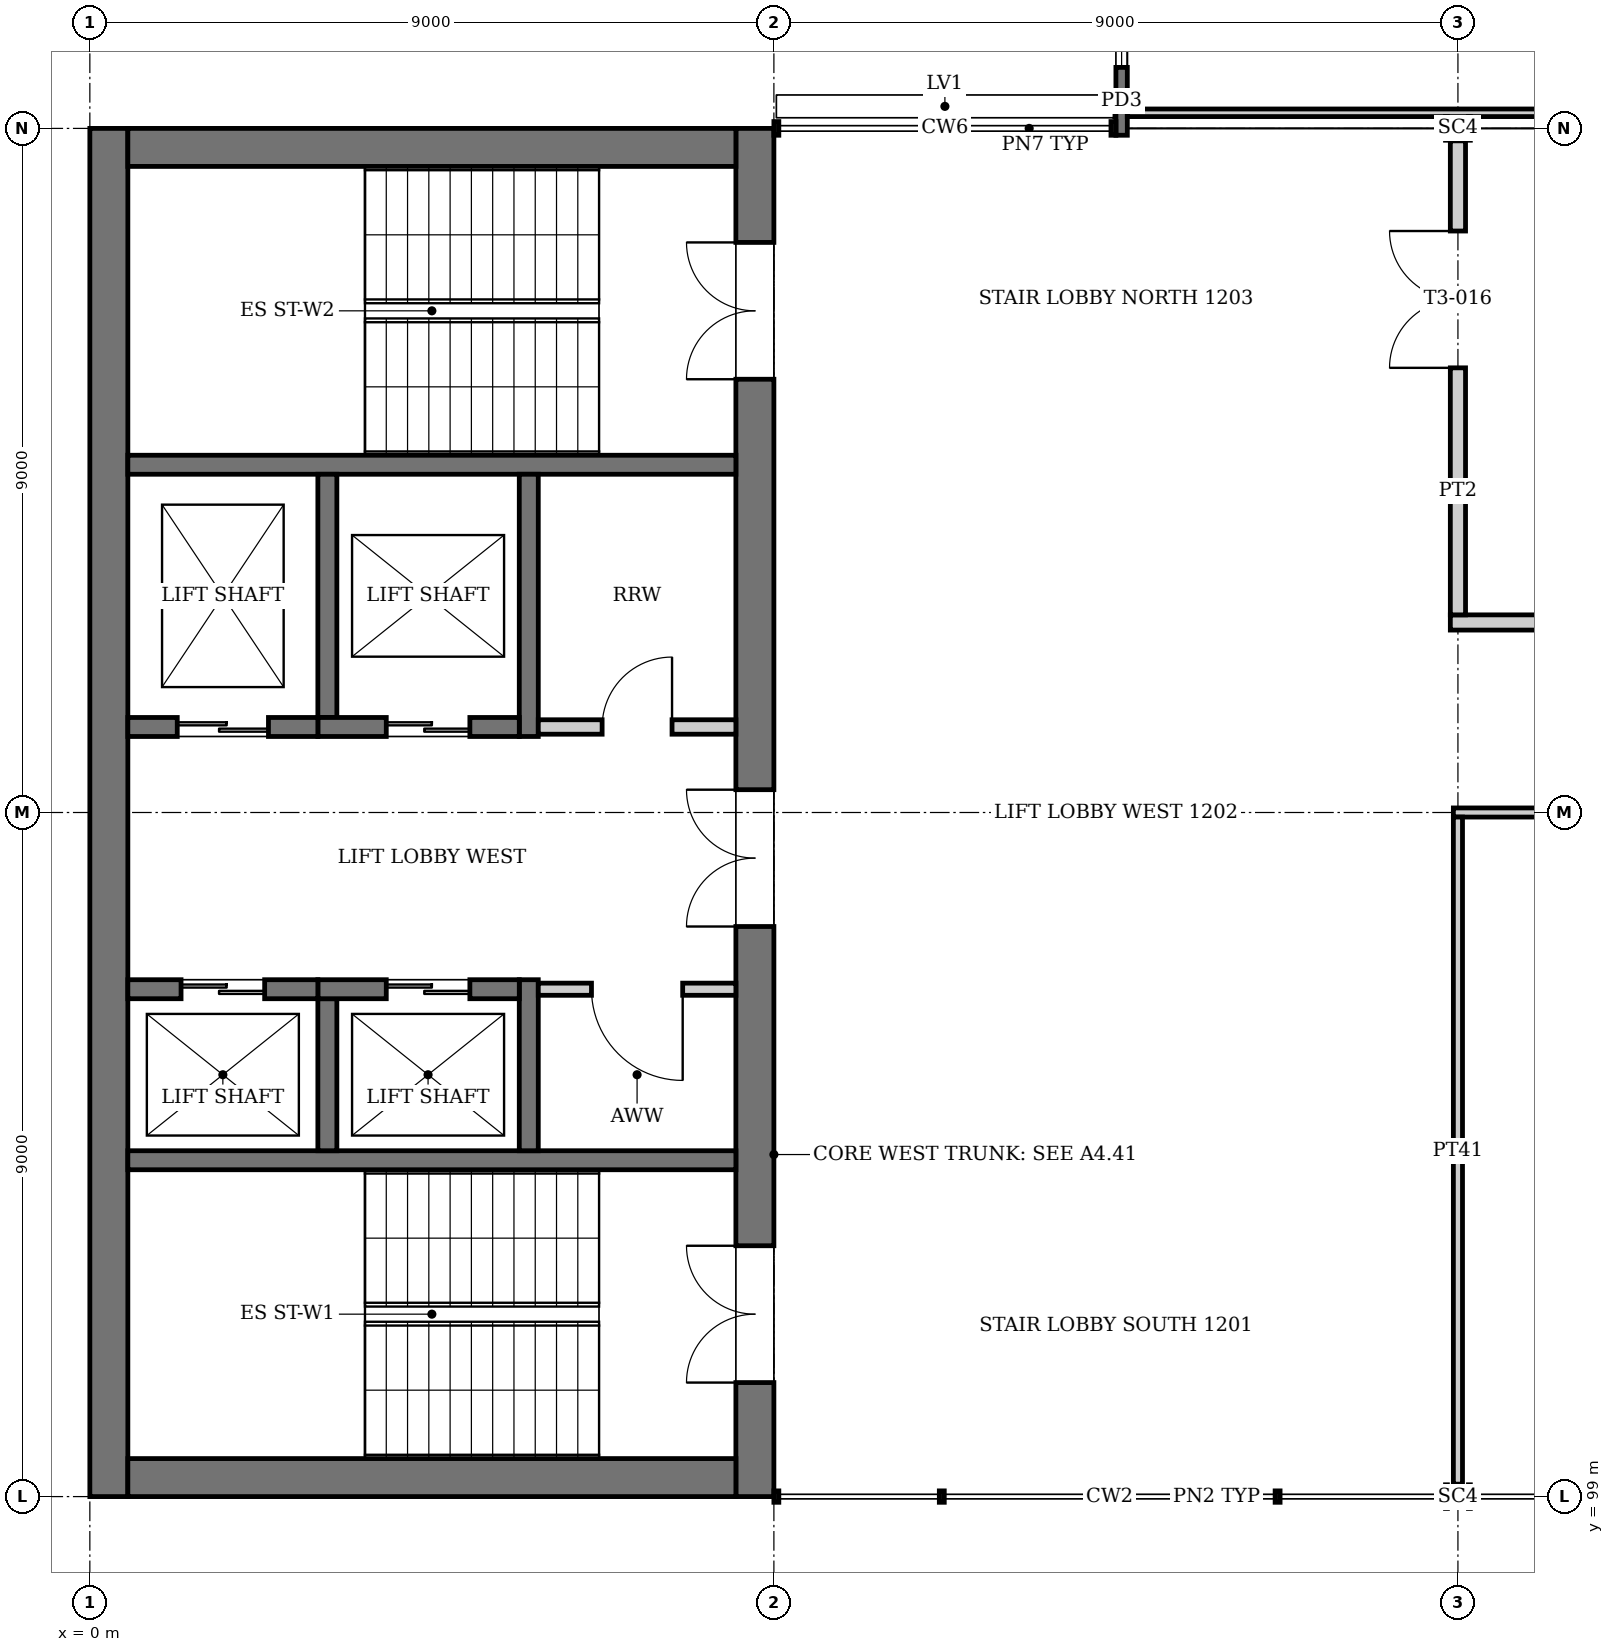
"""IFC4 building model, lengths in metres.
Left out: names, types, materials, properties, quantities, classifications, styles, units other than length and angle.
Written with IfcOpenShell. Run it as: python <this file> out.ifc"""

import sys

from ifc_helpers import new_model, si_unit, direction, frame, frame_2d, origin, origin_2d, place, context, subcontext, project, spatial, rectangle, i_section, extrude, element, fill, save


model = new_model("IFC4")
c1 = context("Model", 3, precision=1e-05, world=origin(), true_north=direction((0.0, 1.0)))
c2 = subcontext(c1, "Body", "Model", "MODEL_VIEW")
j1 = project(units=[si_unit("LENGTHUNIT", "METRE"), si_unit("PLANEANGLEUNIT", "RADIAN")], contexts=[c1])
p1 = place(None, origin())
s1 = spatial("IfcSite", under=j1, at=p1, CompositionType="ELEMENT")
p2 = place(p1, origin())
s2 = spatial("IfcBuilding", under=s1, at=p2, CompositionType="ELEMENT")
p3 = place(p2, frame((0.0, 0.0, 51.2)))
s3 = spatial("IfcBuildingStorey", under=s2, at=p3, CompositionType="ELEMENT", Elevation=51.2)
for number, where, z_axis, x_axis in (
    (1, (18.0, 99.0, 0.0), (0.0, 0.0, 1.0), (0.0, 1.0, 0.0)),
    (2, (18.0, 117.0, 0.0), (0.0, 0.0, 1.0), (0.0, 1.0, 0.0)),
):
    element("IfcColumn", number, at=place(p3, frame(where, z_axis=z_axis, x_axis=x_axis)), inside=s3, PredefinedType="COLUMN", context=c2, shape_type="SweptSolid", body=[
        extrude(i_section(OverallWidth=0.311, OverallDepth=0.327, WebThickness=0.016, FlangeThickness=0.025, at=origin_2d()), origin(), (0.0, 0.0, 1.0), 4.0),
    ])
p4 = place(p3, frame((0.25, 99.0, 0.0), z_axis=(0.0, 0.0, 1.0), x_axis=(0.0, 1.0, 0.0)))
e3 = element("IfcWall", 3, at=p4, inside=s3, PredefinedType="SHEAR", context=c2, shape_type="SweptSolid", body=[
    extrude(rectangle(XDim=18.0, YDim=0.5, at=frame_2d((9.0, 0.0))), origin(), (0.0, 0.0, 1.0), 4.0),
])
p5 = place(p3, frame((8.75, 99.0, 0.0), z_axis=(0.0, 0.0, 1.0), x_axis=(0.0, 1.0, 0.0)))
e4 = element("IfcWall", 4, at=p5, inside=s3, PredefinedType="SHEAR", context=c2, shape_type="SweptSolid", body=[
    extrude(rectangle(XDim=18.0, YDim=0.5, at=frame_2d((9.0, 0.0))), origin(), (0.0, 0.0, 1.0), 4.0),
])
p6 = place(p5, frame((1.5, 0.0, 0.0)))
e5 = element("IfcOpeningElement", 5, at=p6, cuts=e4, PredefinedType="OPENING", context=c2, shape_type="SweptSolid", body=[
    extrude(rectangle(XDim=1.8, YDim=2.1, at=frame_2d((0.9, 1.05))), frame((0.0, 0.26, 0.0), z_axis=(0.0, -1.0, 0.0), x_axis=(1.0, 0.0, 0.0)), (0.0, 0.0, 1.0), 0.52),
])
p7 = place(p5, frame((14.7, 0.0, 0.0)))
e6 = element("IfcOpeningElement", 6, at=p7, cuts=e4, PredefinedType="OPENING", context=c2, shape_type="SweptSolid", body=[
    extrude(rectangle(XDim=1.8, YDim=2.1, at=frame_2d((0.9, 1.05))), frame((0.0, 0.26, 0.0), z_axis=(0.0, -1.0, 0.0), x_axis=(1.0, 0.0, 0.0)), (0.0, 0.0, 1.0), 0.52),
])
p8 = place(p5, frame((7.5, 0.0, 0.0)))
e7 = element("IfcOpeningElement", 7, at=p8, cuts=e4, PredefinedType="OPENING", context=c2, shape_type="SweptSolid", body=[
    extrude(rectangle(XDim=1.8, YDim=2.1, at=frame_2d((0.9, 1.05))), frame((0.0, 0.26, 0.0), z_axis=(0.0, -1.0, 0.0), x_axis=(1.0, 0.0, 0.0)), (0.0, 0.0, 1.0), 0.52),
])
for number, where, z_axis, x_axis in (
    (8, (0.5, 99.25, 0.0), (0.0, 0.0, 1.0), (1.0, 0.0, 0.0)),
    (9, (0.5, 116.75, 0.0), (0.0, 0.0, 1.0), (1.0, 0.0, 0.0)),
):
    element("IfcWall", number, at=place(p3, frame(where, z_axis=z_axis, x_axis=x_axis)), inside=s3, PredefinedType="SHEAR", context=c2, shape_type="SweptSolid", body=[
        extrude(rectangle(XDim=8.0, YDim=0.5, at=frame_2d((4.0, 0.0))), origin(), (0.0, 0.0, 1.0), 4.0),
    ])
p9 = place(p3, frame((13.575, 120.45, -0.15), z_axis=(0.0, 0.0, 1.0), x_axis=(0.0, -1.0, 0.0)))
e10 = element("IfcWall", 10, at=p9, inside=s3, PredefinedType="SOLIDWALL", context=c2, shape_type="SweptSolid", body=[
    extrude(rectangle(XDim=3.54, YDim=0.15, at=frame_2d((1.77, 0.0))), origin(), (0.0, 0.0, 1.0), 2.75),
])
p10 = place(p9, frame((0.647, 0.0, 1.05)))
e11 = element("IfcOpeningElement", 11, at=p10, cuts=e10, PredefinedType="OPENING", context=c2, shape_type="SweptSolid", body=[
    extrude(rectangle(XDim=2.0, YDim=1.4, at=frame_2d((1.0, 0.7))), frame((0.0, 0.085, 0.0), z_axis=(0.0, -1.0, 0.0), x_axis=(1.0, 0.0, 0.0)), (0.0, 0.0, 1.0), 0.17),
])
p11 = place(p3, frame((13.65, 117.206, 0.0), z_axis=(0.0, 0.0, 1.0), x_axis=(1.0, 0.0, 0.0)))
e12 = element("IfcWall", 12, at=p11, inside=s3, PredefinedType="PARTITIONING", context=c2, shape_type="SweptSolid", body=[
    extrude(rectangle(XDim=13.2, YDim=0.1, at=frame_2d((6.6, 0.0))), origin(), (0.0, 0.0, 1.0), 2.6),
])
p12 = place(p11, frame((6.1, 0.0, 0.0)))
e13 = element("IfcOpeningElement", 13, at=p12, cuts=e12, PredefinedType="OPENING", context=c2, shape_type="SweptSolid", body=[
    extrude(rectangle(XDim=0.9, YDim=2.1, at=frame_2d((0.45, 1.05))), frame((0.0, 0.06, 0.0), z_axis=(0.0, -1.0, 0.0), x_axis=(1.0, 0.0, 0.0)), (0.0, 0.0, 1.0), 0.12),
])
for number, where, z_axis, x_axis in (
    (14, (8.5, 103.425, 0.0), (0.0, 0.0, 1.0), (-1.0, 0.0, 0.0)),
    (15, (8.5, 112.575, 0.0), (0.0, 0.0, 1.0), (-1.0, 0.0, 0.0)),
):
    element("IfcWall", number, at=place(p3, frame(where, z_axis=z_axis, x_axis=x_axis)), inside=s3, PredefinedType="SOLIDWALL", context=c2, shape_type="SweptSolid", body=[
        extrude(rectangle(XDim=8.0, YDim=0.25, at=frame_2d((4.0, 0.0))), origin(), (0.0, 0.0, 1.0), 3.75),
    ])
p13 = place(p3, frame((5.775, 103.55, 0.0), z_axis=(0.0, 0.0, 1.0), x_axis=(0.0, 1.0, 0.0)))
e16 = element("IfcWall", 16, at=p13, inside=s3, PredefinedType="SOLIDWALL", context=c2, shape_type="SweptSolid", body=[
    extrude(rectangle(XDim=2.25, YDim=0.25, at=frame_2d((1.125, 0.0))), origin(), (0.0, 0.0, 1.0), 4.0),
])
p14 = place(p3, frame((3.125, 103.55, 0.0), z_axis=(0.0, 0.0, 1.0), x_axis=(0.0, 1.0, 0.0)))
e17 = element("IfcWall", 17, at=p14, inside=s3, PredefinedType="SOLIDWALL", context=c2, shape_type="SweptSolid", body=[
    extrude(rectangle(XDim=2.0, YDim=0.25, at=frame_2d((1.0, 0.0))), origin(), (0.0, 0.0, 1.0), 4.0),
])
p15 = place(p3, frame((5.65, 105.675, 0.0), z_axis=(0.0, 0.0, 1.0), x_axis=(-1.0, 0.0, 0.0)))
e18 = element("IfcWall", 18, at=p15, inside=s3, PredefinedType="SOLIDWALL", context=c2, shape_type="SweptSolid", body=[
    extrude(rectangle(XDim=2.65, YDim=0.25, at=frame_2d((1.325, 0.0))), origin(), (0.0, 0.0, 1.0), 4.0),
])
p16 = place(p15, frame((0.65, 0.0, 0.0)))
e19 = element("IfcOpeningElement", 19, at=p16, cuts=e18, PredefinedType="OPENING", context=c2, shape_type="SweptSolid", body=[
    extrude(rectangle(XDim=1.1, YDim=2.1, at=frame_2d((0.55, 1.05))), frame((0.0, 0.135, 0.0), z_axis=(0.0, -1.0, 0.0), x_axis=(1.0, 0.0, 0.0)), (0.0, 0.0, 1.0), 0.27),
])
p17 = place(p3, frame((3.0, 105.675, 0.0), z_axis=(0.0, 0.0, 1.0), x_axis=(-1.0, 0.0, 0.0)))
e20 = element("IfcWall", 20, at=p17, inside=s3, PredefinedType="SOLIDWALL", context=c2, shape_type="SweptSolid", body=[
    extrude(rectangle(XDim=2.5, YDim=0.25, at=frame_2d((1.25, 0.0))), origin(), (0.0, 0.0, 1.0), 4.0),
])
p18 = place(p17, frame((0.7, 0.0, 0.0)))
e21 = element("IfcOpeningElement", 21, at=p18, cuts=e20, PredefinedType="OPENING", context=c2, shape_type="SweptSolid", body=[
    extrude(rectangle(XDim=1.1, YDim=2.1, at=frame_2d((0.55, 1.05))), frame((0.0, 0.135, 0.0), z_axis=(0.0, -1.0, 0.0), x_axis=(1.0, 0.0, 0.0)), (0.0, 0.0, 1.0), 0.27),
])
p19 = place(p3, frame((5.775, 109.0, 0.0), z_axis=(0.0, 0.0, 1.0), x_axis=(0.0, 1.0, 0.0)))
e22 = element("IfcWall", 22, at=p19, inside=s3, PredefinedType="SOLIDWALL", context=c2, shape_type="SweptSolid", body=[
    extrude(rectangle(XDim=3.45, YDim=0.25, at=frame_2d((1.725, 0.0))), origin(), (0.0, 0.0, 1.0), 4.0),
])
p20 = place(p3, frame((3.125, 109.25, 0.0), z_axis=(0.0, 0.0, 1.0), x_axis=(0.0, 1.0, 0.0)))
e23 = element("IfcWall", 23, at=p20, inside=s3, PredefinedType="SOLIDWALL", context=c2, shape_type="SweptSolid", body=[
    extrude(rectangle(XDim=3.2, YDim=0.25, at=frame_2d((1.6, 0.0))), origin(), (0.0, 0.0, 1.0), 4.0),
])
p21 = place(p3, frame((5.65, 109.125, 0.0), z_axis=(0.0, 0.0, 1.0), x_axis=(-1.0, 0.0, 0.0)))
e24 = element("IfcWall", 24, at=p21, inside=s3, PredefinedType="SOLIDWALL", context=c2, shape_type="SweptSolid", body=[
    extrude(rectangle(XDim=2.65, YDim=0.25, at=frame_2d((1.325, 0.0))), origin(), (0.0, 0.0, 1.0), 4.0),
])
p22 = place(p21, frame((0.65, 0.0, 0.0)))
e25 = element("IfcOpeningElement", 25, at=p22, cuts=e24, PredefinedType="OPENING", context=c2, shape_type="SweptSolid", body=[
    extrude(rectangle(XDim=1.1, YDim=2.1, at=frame_2d((0.55, 1.05))), frame((0.0, 0.135, 0.0), z_axis=(0.0, -1.0, 0.0), x_axis=(1.0, 0.0, 0.0)), (0.0, 0.0, 1.0), 0.27),
])
p23 = place(p3, frame((3.0, 109.125, 0.0), z_axis=(0.0, 0.0, 1.0), x_axis=(-1.0, 0.0, 0.0)))
e26 = element("IfcWall", 26, at=p23, inside=s3, PredefinedType="SOLIDWALL", context=c2, shape_type="SweptSolid", body=[
    extrude(rectangle(XDim=2.5, YDim=0.25, at=frame_2d((1.25, 0.0))), origin(), (0.0, 0.0, 1.0), 4.0),
])
p24 = place(p23, frame((0.65, 0.0, 0.0)))
e27 = element("IfcOpeningElement", 27, at=p24, cuts=e26, PredefinedType="OPENING", context=c2, shape_type="SweptSolid", body=[
    extrude(rectangle(XDim=1.2, YDim=2.1, at=frame_2d((0.6, 1.05))), frame((0.0, 0.135, 0.0), z_axis=(0.0, -1.0, 0.0), x_axis=(1.0, 0.0, 0.0)), (0.0, 0.0, 1.0), 0.27),
])
p25 = place(p3, frame((8.5, 105.675, 0.0), z_axis=(0.0, 0.0, 1.0), x_axis=(-1.0, 0.0, 0.0)))
e28 = element("IfcWall", 28, at=p25, inside=s3, PredefinedType="PARTITIONING", context=c2, shape_type="SweptSolid", body=[
    extrude(rectangle(XDim=2.6, YDim=0.16, at=frame_2d((1.3, 0.0))), origin(), (0.0, 0.0, 1.0), 3.75),
])
p26 = place(p25, frame((0.7, 0.0, 0.0)))
e29 = element("IfcOpeningElement", 29, at=p26, cuts=e28, PredefinedType="OPENING", context=c2, shape_type="SweptSolid", body=[
    extrude(rectangle(XDim=1.2, YDim=2.1, at=frame_2d((0.6, 1.05))), frame((0.0, 0.09, 0.0), z_axis=(0.0, -1.0, 0.0), x_axis=(1.0, 0.0, 0.0)), (0.0, 0.0, 1.0), 0.18),
])
p27 = place(p3, frame((8.5, 109.125, 0.0), z_axis=(0.0, 0.0, 1.0), x_axis=(-1.0, 0.0, 0.0)))
e30 = element("IfcWall", 30, at=p27, inside=s3, PredefinedType="PARTITIONING", context=c2, shape_type="SweptSolid", body=[
    extrude(rectangle(XDim=2.6, YDim=0.19, at=frame_2d((1.3, 0.0))), origin(), (0.0, 0.0, 1.0), 3.75),
])
p28 = place(p27, frame((0.84, 0.0, 0.0)))
e31 = element("IfcOpeningElement", 31, at=p28, cuts=e30, PredefinedType="OPENING", context=c2, shape_type="SweptSolid", body=[
    extrude(rectangle(XDim=0.92, YDim=2.1, at=frame_2d((0.46, 1.05))), frame((0.0, 0.105, 0.0), z_axis=(0.0, -1.0, 0.0), x_axis=(1.0, 0.0, 0.0)), (0.0, 0.0, 1.0), 0.21),
])
p29 = place(p3, frame((17.94, 108.0, 0.0), z_axis=(0.0, 0.0, 1.0), x_axis=(1.0, 0.0, 0.0)))
e32 = element("IfcWall", 32, at=p29, inside=s3, PredefinedType="PARTITIONING", context=c2, shape_type="SweptSolid", body=[
    extrude(rectangle(XDim=17.985, YDim=0.12, at=frame_2d((8.993, 0.0))), origin(), (0.0, 0.0, 1.0), 3.05),
])
p30 = place(p29, frame((3.66, 0.0, 0.0)))
e33 = element("IfcOpeningElement", 33, at=p30, cuts=e32, PredefinedType="OPENING", context=c2, shape_type="SweptSolid", body=[
    extrude(rectangle(XDim=1.8, YDim=2.1, at=frame_2d((0.9, 1.05))), frame((0.0, 0.07, 0.0), z_axis=(0.0, -1.0, 0.0), x_axis=(1.0, 0.0, 0.0)), (0.0, 0.0, 1.0), 0.14),
])
p31 = place(p29, frame((12.66, 0.0, 0.0)))
e34 = element("IfcOpeningElement", 34, at=p31, cuts=e32, PredefinedType="OPENING", context=c2, shape_type="SweptSolid", body=[
    extrude(rectangle(XDim=1.8, YDim=2.1, at=frame_2d((0.9, 1.05))), frame((0.0, 0.07, 0.0), z_axis=(0.0, -1.0, 0.0), x_axis=(1.0, 0.0, 0.0)), (0.0, 0.0, 1.0), 0.14),
])
p32 = place(p3, frame((17.9, 110.5, 0.0), z_axis=(0.0, 0.0, 1.0), x_axis=(1.0, 0.0, 0.0)))
e35 = element("IfcWall", 35, at=p32, inside=s3, PredefinedType="PARTITIONING", context=c2, shape_type="SweptSolid", body=[
    extrude(rectangle(XDim=22.7, YDim=0.2, at=frame_2d((11.35, 0.0))), origin(), (0.0, 0.0, 1.0), 3.05),
])
p33 = place(p32, frame((10.45, 0.0, 0.0)))
e36 = element("IfcOpeningElement", 36, at=p33, cuts=e35, PredefinedType="OPENING", context=c2, shape_type="SweptSolid", body=[
    extrude(rectangle(XDim=1.8, YDim=2.1, at=frame_2d((0.9, 1.05))), frame((0.0, 0.11, 0.0), z_axis=(0.0, -1.0, 0.0), x_axis=(1.0, 0.0, 0.0)), (0.0, 0.0, 1.0), 0.22),
])
p34 = place(p3, frame((18.0, 99.164, 0.0), z_axis=(0.0, 0.0, 1.0), x_axis=(0.0, 1.0, 0.0)))
e37 = element("IfcWall", 37, at=p34, inside=s3, PredefinedType="PARTITIONING", context=c2, shape_type="SweptSolid", body=[
    extrude(rectangle(XDim=8.776, YDim=0.12, at=frame_2d((4.388, 0.0))), origin(), (0.0, 0.0, 1.0), 3.05),
])
p35 = place(p3, frame((18.0, 110.6, 0.0), z_axis=(0.0, 0.0, 1.0), x_axis=(0.0, 1.0, 0.0)))
e38 = element("IfcWall", 38, at=p35, inside=s3, PredefinedType="PARTITIONING", context=c2, shape_type="SweptSolid", body=[
    extrude(rectangle(XDim=6.236, YDim=0.2, at=frame_2d((3.118, 0.0))), origin(), (0.0, 0.0, 1.0), 3.05),
])
p36 = place(p35, frame((3.25, 0.0, 0.0)))
e39 = element("IfcOpeningElement", 39, at=p36, cuts=e38, PredefinedType="OPENING", context=c2, shape_type="SweptSolid", body=[
    extrude(rectangle(XDim=1.8, YDim=2.1, at=frame_2d((0.9, 1.05))), frame((0.0, 0.11, 0.0), z_axis=(0.0, -1.0, 0.0), x_axis=(1.0, 0.0, 0.0)), (0.0, 0.0, 1.0), 0.22),
])
p37 = place(p10, origin())
e40 = element("IfcWindow", 40, at=p37, inside=s3, PartitioningType="SINGLE_PANEL", PredefinedType="WINDOW", context=c2, shape_type="SweptSolid", body=[
    extrude(rectangle(XDim=2.0, YDim=1.4, at=frame_2d((1.0, 0.7))), frame((0.0, 0.03, 0.0), z_axis=(0.0, -1.0, 0.0), x_axis=(1.0, 0.0, 0.0)), (0.0, 0.0, 1.0), 0.06),
])
fill(e11, e40)
p38 = place(p16, origin())
e41 = element("IfcDoor", 41, at=p38, inside=s3, OperationType="DOUBLE_DOOR_SLIDING", PredefinedType="DOOR", context=c2, shape_type="SweptSolid", body=[
    extrude(rectangle(XDim=1.1, YDim=2.1, at=frame_2d((0.55, 1.05))), frame((0.0, 0.025, 0.0), z_axis=(0.0, -1.0, 0.0), x_axis=(1.0, 0.0, 0.0)), (0.0, 0.0, 1.0), 0.05),
])
fill(e19, e41)
p39 = place(p18, origin())
e42 = element("IfcDoor", 42, at=p39, inside=s3, OperationType="DOUBLE_DOOR_SLIDING", PredefinedType="DOOR", context=c2, shape_type="SweptSolid", body=[
    extrude(rectangle(XDim=1.1, YDim=2.1, at=frame_2d((0.55, 1.05))), frame((0.0, 0.025, 0.0), z_axis=(0.0, -1.0, 0.0), x_axis=(1.0, 0.0, 0.0)), (0.0, 0.0, 1.0), 0.05),
])
fill(e21, e42)
p40 = place(p22, origin())
e43 = element("IfcDoor", 43, at=p40, inside=s3, OperationType="DOUBLE_DOOR_SLIDING", PredefinedType="DOOR", context=c2, shape_type="SweptSolid", body=[
    extrude(rectangle(XDim=1.1, YDim=2.1, at=frame_2d((0.55, 1.05))), frame((0.0, 0.025, 0.0), z_axis=(0.0, -1.0, 0.0), x_axis=(1.0, 0.0, 0.0)), (0.0, 0.0, 1.0), 0.05),
])
fill(e25, e43)
p41 = place(p24, origin())
e44 = element("IfcDoor", 44, at=p41, inside=s3, OperationType="DOUBLE_DOOR_SLIDING", PredefinedType="DOOR", context=c2, shape_type="SweptSolid", body=[
    extrude(rectangle(XDim=1.2, YDim=2.1, at=frame_2d((0.6, 1.05))), frame((0.0, 0.025, 0.0), z_axis=(0.0, -1.0, 0.0), x_axis=(1.0, 0.0, 0.0)), (0.0, 0.0, 1.0), 0.05),
])
fill(e27, e44)
p42 = place(p36, origin())
e45 = element("IfcDoor", 45, at=p42, inside=s3, OperationType="DOUBLE_DOOR_SINGLE_SWING", PredefinedType="DOOR", context=c2, shape_type="SweptSolid", body=[
    extrude(rectangle(XDim=1.8, YDim=2.1, at=frame_2d((0.9, 1.05))), frame((0.0, 0.025, 0.0), z_axis=(0.0, -1.0, 0.0), x_axis=(1.0, 0.0, 0.0)), (0.0, 0.0, 1.0), 0.05),
])
fill(e39, e45)
p43 = place(p6, origin())
e46 = element("IfcDoor", 46, at=p43, inside=s3, OperationType="DOUBLE_DOOR_SINGLE_SWING", PredefinedType="DOOR", context=c2, shape_type="SweptSolid", body=[
    extrude(rectangle(XDim=1.8, YDim=2.1, at=frame_2d((0.9, 1.05))), frame((0.0, 0.025, 0.0), z_axis=(0.0, -1.0, 0.0), x_axis=(1.0, 0.0, 0.0)), (0.0, 0.0, 1.0), 0.05),
])
fill(e5, e46)
p44 = place(p7, origin())
e47 = element("IfcDoor", 47, at=p44, inside=s3, OperationType="DOUBLE_DOOR_SINGLE_SWING", PredefinedType="DOOR", context=c2, shape_type="SweptSolid", body=[
    extrude(rectangle(XDim=1.8, YDim=2.1, at=frame_2d((0.9, 1.05))), frame((0.0, 0.025, 0.0), z_axis=(0.0, -1.0, 0.0), x_axis=(1.0, 0.0, 0.0)), (0.0, 0.0, 1.0), 0.05),
])
fill(e6, e47)
p45 = place(p8, origin())
e48 = element("IfcDoor", 48, at=p45, inside=s3, OperationType="DOUBLE_DOOR_SINGLE_SWING", PredefinedType="DOOR", context=c2, shape_type="SweptSolid", body=[
    extrude(rectangle(XDim=1.8, YDim=2.1, at=frame_2d((0.9, 1.05))), frame((0.0, 0.025, 0.0), z_axis=(0.0, -1.0, 0.0), x_axis=(1.0, 0.0, 0.0)), (0.0, 0.0, 1.0), 0.05),
])
fill(e7, e48)
p46 = place(p26, origin())
e49 = element("IfcDoor", 49, at=p46, inside=s3, OperationType="SINGLE_SWING_LEFT", PredefinedType="DOOR", context=c2, shape_type="SweptSolid", body=[
    extrude(rectangle(XDim=1.2, YDim=2.1, at=frame_2d((0.6, 1.05))), frame((0.0, 0.025, 0.0), z_axis=(0.0, -1.0, 0.0), x_axis=(1.0, 0.0, 0.0)), (0.0, 0.0, 1.0), 0.05),
])
fill(e29, e49)
p47 = place(p28, frame((0.92, 0.0, 0.0), z_axis=(0.0, 0.0, 1.0), x_axis=(-1.0, 0.0, 0.0)))
e50 = element("IfcDoor", 50, at=p47, inside=s3, OperationType="SINGLE_SWING_RIGHT", PredefinedType="DOOR", context=c2, shape_type="SweptSolid", body=[
    extrude(rectangle(XDim=0.92, YDim=2.1, at=frame_2d((0.46, 1.05))), frame((0.0, 0.025, 0.0), z_axis=(0.0, -1.0, 0.0), x_axis=(1.0, 0.0, 0.0)), (0.0, 0.0, 1.0), 0.05),
])
fill(e31, e50)
save(model, sys.argv[1])
